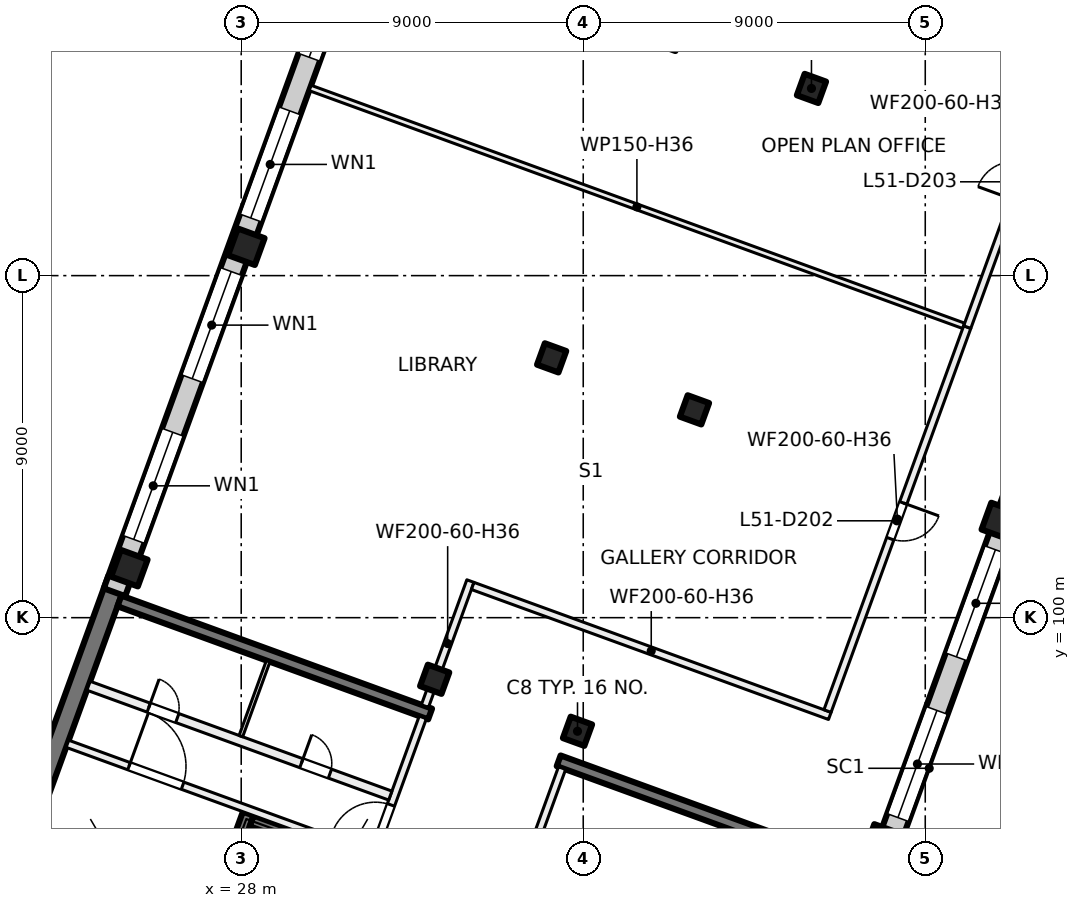
"""IFC4 building model, lengths in metres.
Left out: names, types, materials, properties, quantities, classifications, styles, units other than length and angle.
Written with IfcOpenShell. Run it as: python <this file> out.ifc"""

import sys

from ifc_helpers import new_model, si_unit, direction, frame, frame_2d, origin, origin_2d, place, context, subcontext, project, spatial, rectangle, extrude, element, fill, save


model = new_model("IFC4")
c1 = context("Model", 3, precision=1e-05, world=origin(), true_north=direction((0.0, 1.0)))
c2 = subcontext(c1, "Body", "Model", "MODEL_VIEW")
j1 = project(units=[si_unit("LENGTHUNIT", "METRE"), si_unit("PLANEANGLEUNIT", "RADIAN")], contexts=[c1])
p1 = place(None, origin())
s1 = spatial("IfcSite", under=j1, at=p1, CompositionType="ELEMENT")
p2 = place(p1, origin())
s2 = spatial("IfcBuilding", under=s1, at=p2, CompositionType="ELEMENT")
p3 = place(p2, frame((0.0, 0.0, 216.0)))
s3 = spatial("IfcBuildingStorey", under=s2, at=p3, CompositionType="ELEMENT", Elevation=216.0)
for number, where, z_axis, x_axis in (
    (1, (43.006, 113.925, 0.0), (0.0, 0.0, 1.0), (-0.342, -0.94, 0.0)),
    (2, (39.927, 105.468, 0.0), (0.0, 0.0, 1.0), (-0.342, -0.94, 0.0)),
    (3, (36.849, 97.011, 0.0), (0.0, 0.0, 1.0), (-0.342, -0.94, 0.0)),
    (4, (36.169, 106.836, 0.0), (0.0, 0.0, 1.0), (-0.342, -0.94, 0.0)),
    (5, (33.091, 98.379, 0.0), (0.0, 0.0, 1.0), (-0.342, -0.94, 0.0)),
):
    element("IfcColumn", number, at=place(p3, frame(where, z_axis=z_axis, x_axis=x_axis)), inside=s3, PredefinedType="COLUMN", context=c2, shape_type="SweptSolid", body=[
        extrude(rectangle(XDim=0.6, YDim=0.6, at=origin_2d()), origin(), (0.0, 0.0, 1.0), 4.0),
    ])
for number, where, z_axis, x_axis in (
    (6, (47.962, 102.544, 0.0), (0.0, 0.0, 1.0), (-0.342, -0.94, 0.0)),
    (7, (44.884, 94.087, 0.0), (0.0, 0.0, 1.0), (-0.342, -0.94, 0.0)),
    (8, (28.134, 109.76, 0.0), (0.0, 0.0, 1.0), (-0.342, -0.94, 0.0)),
    (9, (25.056, 101.303, 0.0), (0.0, 0.0, 1.0), (-0.342, -0.94, 0.0)),
):
    element("IfcColumn", number, at=place(p3, frame(where, z_axis=z_axis, x_axis=x_axis)), inside=s3, PredefinedType="COLUMN", context=c2, shape_type="SweptSolid", body=[
        extrude(rectangle(XDim=0.75, YDim=0.75, at=origin_2d()), origin(), (0.0, 0.0, 1.0), 4.0),
    ])
p4 = place(p3, frame((21.67, 92.585, 0.0), z_axis=(0.0, 0.0, 1.0), x_axis=(0.342035714298, 0.93968695327, 0.0)))
e10 = element("IfcWall", 10, at=p4, inside=s3, PredefinedType="SHEAR", context=c2, shape_type="SweptSolid", body=[
    extrude(rectangle(XDim=8.975, YDim=0.5, at=frame_2d((4.488, 0.0))), origin(), (0.0, 0.0, 1.0), 4.0),
])
p5 = place(p3, frame((23.996, 83.332, 0.0), z_axis=(0.0, 0.0, 1.0), x_axis=(0.342016684409, 0.939693879721, 0.0)))
e11 = element("IfcWall", 11, at=p5, inside=s3, PredefinedType="SHEAR", context=c2, shape_type="SweptSolid", body=[
    extrude(rectangle(XDim=12.25, YDim=0.3, at=frame_2d((6.125, 0.0))), origin(), (0.0, 0.0, 1.0), 4.0),
])
p6 = place(p5, frame((8.0, 0.0, 0.0)))
e12 = element("IfcOpeningElement", 12, at=p6, cuts=e11, PredefinedType="OPENING", context=c2, shape_type="SweptSolid", body=[
    extrude(rectangle(XDim=1.1, YDim=2.1, at=frame_2d((0.55, 1.05))), frame((0.0, 0.16, 0.0), z_axis=(0.0, -1.0, 0.0), x_axis=(1.0, 0.0, 0.0)), (0.0, 0.0, 1.0), 0.32),
])
p7 = place(p3, frame((31.188, 93.591, 0.0), z_axis=(0.0, 0.0, 1.0), x_axis=(-0.939680694448, 0.342052908892, 0.0)))
e13 = element("IfcWall", 13, at=p7, inside=s3, PredefinedType="SHEAR", context=c2, shape_type="SweptSolid", body=[
    extrude(rectangle(XDim=3.1, YDim=0.3, at=frame_2d((1.55, 0.0))), origin(), (0.0, 0.0, 1.0), 4.0),
])
p8 = place(p3, frame((44.529, 93.258, 0.0), z_axis=(0.0, 0.0, 1.0), x_axis=(-0.9396917844, 0.342022441267, 0.0)))
e14 = element("IfcWall", 14, at=p8, inside=s3, PredefinedType="SHEAR", context=c2, shape_type="SweptSolid", body=[
    extrude(rectangle(XDim=8.7, YDim=0.3, at=frame_2d((4.35, 0.0))), origin(), (0.0, 0.0, 1.0), 4.0),
])
p9 = place(p3, frame((32.971, 97.465, 0.0), z_axis=(0.0, 0.0, 1.0), x_axis=(-0.939695066972, 0.34201342241, 0.0)))
e15 = element("IfcWall", 15, at=p9, inside=s3, PredefinedType="SHEAR", context=c2, shape_type="SweptSolid", body=[
    extrude(rectangle(XDim=8.7, YDim=0.3, at=frame_2d((4.35, 0.0))), origin(), (0.0, 0.0, 1.0), 4.0),
])
p10 = place(p3, frame((51.877, 112.862, 0.0), z_axis=(0.0, 0.0, 1.0), x_axis=(-0.342020589714, -0.939692458314, 0.0)))
e16 = element("IfcWall", 16, at=p10, inside=s3, PredefinedType="SOLIDWALL", context=c2, shape_type="SweptSolid", body=[
    extrude(rectangle(XDim=20.765, YDim=0.6, at=frame_2d((10.382, 0.0))), origin(), (0.0, 0.0, 1.0), 3.625),
])
p11 = place(p10, frame((2.785, 0.0, 0.9)))
e17 = element("IfcOpeningElement", 17, at=p11, cuts=e16, PredefinedType="OPENING", context=c2, shape_type="SweptSolid", body=[
    extrude(rectangle(XDim=3.0, YDim=2.4, at=frame_2d((1.5, 1.2))), frame((0.0, 0.31, 0.0), z_axis=(0.0, -1.0, 0.0), x_axis=(1.0, 0.0, 0.0)), (0.0, 0.0, 1.0), 0.62),
])
p12 = place(p10, frame((7.285, 0.0, 0.9)))
e18 = element("IfcOpeningElement", 18, at=p12, cuts=e16, PredefinedType="OPENING", context=c2, shape_type="SweptSolid", body=[
    extrude(rectangle(XDim=3.0, YDim=2.4, at=frame_2d((1.5, 1.2))), frame((0.0, 0.31, 0.0), z_axis=(0.0, -1.0, 0.0), x_axis=(1.0, 0.0, 0.0)), (0.0, 0.0, 1.0), 0.62),
])
p13 = place(p10, frame((11.785, 0.0, 0.9)))
e19 = element("IfcOpeningElement", 19, at=p13, cuts=e16, PredefinedType="OPENING", context=c2, shape_type="SweptSolid", body=[
    extrude(rectangle(XDim=3.0, YDim=2.4, at=frame_2d((1.5, 1.2))), frame((0.0, 0.31, 0.0), z_axis=(0.0, -1.0, 0.0), x_axis=(1.0, 0.0, 0.0)), (0.0, 0.0, 1.0), 0.62),
])
p14 = place(p10, frame((16.285, 0.0, 0.9)))
e20 = element("IfcOpeningElement", 20, at=p14, cuts=e16, PredefinedType="OPENING", context=c2, shape_type="SweptSolid", body=[
    extrude(rectangle(XDim=3.0, YDim=2.4, at=frame_2d((1.5, 1.2))), frame((0.0, 0.31, 0.0), z_axis=(0.0, -1.0, 0.0), x_axis=(1.0, 0.0, 0.0)), (0.0, 0.0, 1.0), 0.62),
])
p15 = place(p3, frame((36.923, 134.338, 0.0), z_axis=(0.0, 0.0, 1.0), x_axis=(0.573575266068, -0.819152863729, 0.0)))
e21 = element("IfcWall", 21, at=p15, inside=s3, PredefinedType="SOLIDWALL", context=c2, shape_type="SweptSolid", body=[
    extrude(rectangle(XDim=26.117, YDim=0.6, at=frame_2d((13.059, 0.0))), origin(), (0.0, 0.0, 1.0), 3.625),
])
p16 = place(p15, frame((0.84, 0.0, 0.9)))
e22 = element("IfcOpeningElement", 22, at=p16, cuts=e21, PredefinedType="OPENING", context=c2, shape_type="SweptSolid", body=[
    extrude(rectangle(XDim=3.0, YDim=2.4, at=frame_2d((1.5, 1.2))), frame((0.0, 0.31, 0.0), z_axis=(0.0, -1.0, 0.0), x_axis=(1.0, 0.0, 0.0)), (0.0, 0.0, 1.0), 0.62),
])
p17 = place(p15, frame((5.069, 0.0, 0.9)))
e23 = element("IfcOpeningElement", 23, at=p17, cuts=e21, PredefinedType="OPENING", context=c2, shape_type="SweptSolid", body=[
    extrude(rectangle(XDim=3.0, YDim=2.4, at=frame_2d((1.5, 1.2))), frame((0.0, 0.31, 0.0), z_axis=(0.0, -1.0, 0.0), x_axis=(1.0, 0.0, 0.0)), (0.0, 0.0, 1.0), 0.62),
])
p18 = place(p15, frame((9.449, 0.0, 0.9)))
e24 = element("IfcOpeningElement", 24, at=p18, cuts=e21, PredefinedType="OPENING", context=c2, shape_type="SweptSolid", body=[
    extrude(rectangle(XDim=3.0, YDim=2.4, at=frame_2d((1.5, 1.2))), frame((0.0, 0.31, 0.0), z_axis=(0.0, -1.0, 0.0), x_axis=(1.0, 0.0, 0.0)), (0.0, 0.0, 1.0), 0.62),
])
p19 = place(p15, frame((13.829, 0.0, 0.9)))
e25 = element("IfcOpeningElement", 25, at=p19, cuts=e21, PredefinedType="OPENING", context=c2, shape_type="SweptSolid", body=[
    extrude(rectangle(XDim=3.0, YDim=2.4, at=frame_2d((1.5, 1.2))), frame((0.0, 0.31, 0.0), z_axis=(0.0, -1.0, 0.0), x_axis=(1.0, 0.0, 0.0)), (0.0, 0.0, 1.0), 0.62),
])
p20 = place(p15, frame((18.208, 0.0, 0.9)))
e26 = element("IfcOpeningElement", 26, at=p20, cuts=e21, PredefinedType="OPENING", context=c2, shape_type="SweptSolid", body=[
    extrude(rectangle(XDim=3.0, YDim=2.4, at=frame_2d((1.5, 1.2))), frame((0.0, 0.31, 0.0), z_axis=(0.0, -1.0, 0.0), x_axis=(1.0, 0.0, 0.0)), (0.0, 0.0, 1.0), 0.62),
])
p21 = place(p15, frame((22.438, 0.0, 0.9)))
e27 = element("IfcOpeningElement", 27, at=p21, cuts=e21, PredefinedType="OPENING", context=c2, shape_type="SweptSolid", body=[
    extrude(rectangle(XDim=3.0, YDim=2.4, at=frame_2d((1.5, 1.2))), frame((0.0, 0.31, 0.0), z_axis=(0.0, -1.0, 0.0), x_axis=(1.0, 0.0, 0.0)), (0.0, 0.0, 1.0), 0.62),
])
p22 = place(p3, frame((24.666, 100.669, 0.0), z_axis=(0.0, 0.0, 1.0), x_axis=(0.34201964167, 0.939692803373, 0.0)))
e28 = element("IfcWall", 28, at=p22, inside=s3, PredefinedType="SOLIDWALL", context=c2, shape_type="SweptSolid", body=[
    extrude(rectangle(XDim=32.884, YDim=0.6, at=frame_2d((16.442, 0.0))), origin(), (0.0, 0.0, 1.0), 3.625),
])
p23 = place(p22, frame((1.48, 0.0, 0.9)))
e29 = element("IfcOpeningElement", 29, at=p23, cuts=e28, PredefinedType="OPENING", context=c2, shape_type="SweptSolid", body=[
    extrude(rectangle(XDim=3.0, YDim=2.4, at=frame_2d((1.5, 1.2))), frame((0.0, 0.31, 0.0), z_axis=(0.0, -1.0, 0.0), x_axis=(1.0, 0.0, 0.0)), (0.0, 0.0, 1.0), 0.62),
])
p24 = place(p22, frame((5.98, 0.0, 0.9)))
e30 = element("IfcOpeningElement", 30, at=p24, cuts=e28, PredefinedType="OPENING", context=c2, shape_type="SweptSolid", body=[
    extrude(rectangle(XDim=3.0, YDim=2.4, at=frame_2d((1.5, 1.2))), frame((0.0, 0.31, 0.0), z_axis=(0.0, -1.0, 0.0), x_axis=(1.0, 0.0, 0.0)), (0.0, 0.0, 1.0), 0.62),
])
p25 = place(p22, frame((10.48, 0.0, 0.9)))
e31 = element("IfcOpeningElement", 31, at=p25, cuts=e28, PredefinedType="OPENING", context=c2, shape_type="SweptSolid", body=[
    extrude(rectangle(XDim=3.0, YDim=2.4, at=frame_2d((1.5, 1.2))), frame((0.0, 0.31, 0.0), z_axis=(0.0, -1.0, 0.0), x_axis=(1.0, 0.0, 0.0)), (0.0, 0.0, 1.0), 0.62),
])
p26 = place(p22, frame((14.98, 0.0, 0.9)))
e32 = element("IfcOpeningElement", 32, at=p26, cuts=e28, PredefinedType="OPENING", context=c2, shape_type="SweptSolid", body=[
    extrude(rectangle(XDim=3.0, YDim=2.4, at=frame_2d((1.5, 1.2))), frame((0.0, 0.31, 0.0), z_axis=(0.0, -1.0, 0.0), x_axis=(1.0, 0.0, 0.0)), (0.0, 0.0, 1.0), 0.62),
])
p27 = place(p22, frame((19.48, 0.0, 0.9)))
e33 = element("IfcOpeningElement", 33, at=p27, cuts=e28, PredefinedType="OPENING", context=c2, shape_type="SweptSolid", body=[
    extrude(rectangle(XDim=3.0, YDim=2.4, at=frame_2d((1.5, 1.2))), frame((0.0, 0.31, 0.0), z_axis=(0.0, -1.0, 0.0), x_axis=(1.0, 0.0, 0.0)), (0.0, 0.0, 1.0), 0.62),
])
p28 = place(p22, frame((23.98, 0.0, 0.9)))
e34 = element("IfcOpeningElement", 34, at=p28, cuts=e28, PredefinedType="OPENING", context=c2, shape_type="SweptSolid", body=[
    extrude(rectangle(XDim=3.0, YDim=2.4, at=frame_2d((1.5, 1.2))), frame((0.0, 0.31, 0.0), z_axis=(0.0, -1.0, 0.0), x_axis=(1.0, 0.0, 0.0)), (0.0, 0.0, 1.0), 0.62),
])
p29 = place(p22, frame((28.48, 0.0, 0.9)))
e35 = element("IfcOpeningElement", 35, at=p29, cuts=e28, PredefinedType="OPENING", context=c2, shape_type="SweptSolid", body=[
    extrude(rectangle(XDim=3.0, YDim=2.4, at=frame_2d((1.5, 1.2))), frame((0.0, 0.31, 0.0), z_axis=(0.0, -1.0, 0.0), x_axis=(1.0, 0.0, 0.0)), (0.0, 0.0, 1.0), 0.62),
])
p30 = place(p3, frame((31.427, 93.663, 0.0), z_axis=(0.0, 0.0, 1.0), x_axis=(0.342030870568, 0.93968871632, 0.0)))
e36 = element("IfcWall", 36, at=p30, inside=s3, PredefinedType="PARTITIONING", context=c2, shape_type="SweptSolid", body=[
    extrude(rectangle(XDim=3.95, YDim=0.2, at=frame_2d((1.975, 0.0))), origin(), (0.0, 0.0, 1.0), 3.625),
])
p31 = place(p30, frame((0.3, 0.0, 0.0)))
e37 = element("IfcOpeningElement", 37, at=p31, cuts=e36, PredefinedType="OPENING", context=c2, shape_type="SweptSolid", body=[
    extrude(rectangle(XDim=1.2, YDim=2.1, at=frame_2d((0.6, 1.05))), frame((0.0, 0.11, 0.0), z_axis=(0.0, -1.0, 0.0), x_axis=(1.0, 0.0, 0.0)), (0.0, 0.0, 1.0), 0.22),
])
p32 = place(p3, frame((23.427, 96.682, 0.0), z_axis=(0.0, 0.0, 1.0), x_axis=(0.939690465531, -0.342026064782, 0.0)))
e38 = element("IfcWall", 38, at=p32, inside=s3, PredefinedType="PARTITIONING", context=c2, shape_type="SweptSolid", body=[
    extrude(rectangle(XDim=8.45, YDim=0.2, at=frame_2d((4.225, 0.0))), origin(), (0.0, 0.0, 1.0), 3.625),
])
p33 = place(p32, frame((1.725, 0.0, 0.0)))
e39 = element("IfcOpeningElement", 39, at=p33, cuts=e38, PredefinedType="OPENING", context=c2, shape_type="SweptSolid", body=[
    extrude(rectangle(XDim=1.5, YDim=2.1, at=frame_2d((0.75, 1.05))), frame((0.0, 0.11, 0.0), z_axis=(0.0, -1.0, 0.0), x_axis=(1.0, 0.0, 0.0)), (0.0, 0.0, 1.0), 0.22),
])
p34 = place(p3, frame((23.983, 98.208, 0.0), z_axis=(0.0, 0.0, 1.0), x_axis=(0.939699751196, -0.342000552051, 0.0)))
e40 = element("IfcWall", 40, at=p34, inside=s3, PredefinedType="PARTITIONING", context=c2, shape_type="SweptSolid", body=[
    extrude(rectangle(XDim=8.45, YDim=0.25, at=frame_2d((4.225, 0.0))), origin(), (0.0, 0.0, 1.0), 3.625),
])
p35 = place(p34, frame((5.96, 0.0, 0.0)))
e41 = element("IfcOpeningElement", 41, at=p35, cuts=e40, PredefinedType="OPENING", context=c2, shape_type="SweptSolid", body=[
    extrude(rectangle(XDim=0.8, YDim=2.1, at=frame_2d((0.4, 1.05))), frame((0.0, 0.135, 0.0), z_axis=(0.0, -1.0, 0.0), x_axis=(1.0, 0.0, 0.0)), (0.0, 0.0, 1.0), 0.27),
])
p36 = place(p34, frame((1.685, 0.0, 0.0)))
e42 = element("IfcOpeningElement", 42, at=p36, cuts=e40, PredefinedType="OPENING", context=c2, shape_type="SweptSolid", body=[
    extrude(rectangle(XDim=0.8, YDim=2.1, at=frame_2d((0.4, 1.05))), frame((0.0, 0.135, 0.0), z_axis=(0.0, -1.0, 0.0), x_axis=(1.0, 0.0, 0.0)), (0.0, 0.0, 1.0), 0.27),
])
p37 = place(p3, frame((27.991, 96.883, 0.0), z_axis=(0.0, 0.0, 1.0), x_axis=(0.342023078919, 0.939691552312, 0.0)))
e43 = element("IfcWall", 43, at=p37, inside=s3, PredefinedType="PARTITIONING", context=c2, shape_type="SweptSolid", body=[
    extrude(rectangle(XDim=2.1, YDim=0.1, at=frame_2d((1.05, 0.0))), origin(), (0.0, 0.0, 1.0), 3.625),
])
p38 = place(p3, frame((36.443, 96.041, 0.0), z_axis=(0.0, 0.0, 1.0), x_axis=(-0.341996156931, -0.939701350773, 0.0)))
e44 = element("IfcWall", 44, at=p38, inside=s3, PredefinedType="PARTITIONING", context=c2, shape_type="SweptSolid", body=[
    extrude(rectangle(XDim=3.95, YDim=0.2, at=frame_2d((1.975, 0.0))), origin(), (0.0, 0.0, 1.0), 3.625),
])
p39 = place(p38, frame((2.45, 0.0, 0.0)))
e45 = element("IfcOpeningElement", 45, at=p39, cuts=e44, PredefinedType="OPENING", context=c2, shape_type="SweptSolid", body=[
    extrude(rectangle(XDim=1.2, YDim=2.1, at=frame_2d((0.6, 1.05))), frame((0.0, 0.11, 0.0), z_axis=(0.0, -1.0, 0.0), x_axis=(1.0, 0.0, 0.0)), (0.0, 0.0, 1.0), 0.22),
])
p40 = place(p3, frame((29.814, 113.938, 0.0), z_axis=(0.0, 0.0, 1.0), x_axis=(0.939695619185, -0.342011905181, 0.0)))
e46 = element("IfcWall", 46, at=p40, inside=s3, PredefinedType="PARTITIONING", context=c2, shape_type="SweptSolid", body=[
    extrude(rectangle(XDim=18.301, YDim=0.15, at=frame_2d((9.15, 0.0))), origin(), (0.0, 0.0, 1.0), 3.625),
])
p41 = place(p3, frame((32.834, 97.674, 0.0), z_axis=(0.0, 0.0, 1.0), x_axis=(0.342017493073, 0.939693585395, 0.0)))
e47 = element("IfcWall", 47, at=p41, inside=s3, PredefinedType="PARTITIONING", context=c2, shape_type="SweptSolid", body=[
    extrude(rectangle(XDim=3.5, YDim=0.2, at=frame_2d((1.75, 0.0))), origin(), (0.0, 0.0, 1.0), 3.625),
])
p42 = place(p3, frame((34.091, 100.835, 0.0), z_axis=(0.0, 0.0, 1.0), x_axis=(0.939702148643, -0.341993964619, 0.0)))
e48 = element("IfcWall", 48, at=p42, inside=s3, PredefinedType="PARTITIONING", context=c2, shape_type="SweptSolid", body=[
    extrude(rectangle(XDim=10.0, YDim=0.2, at=frame_2d((5.0, 0.0))), origin(), (0.0, 0.0, 1.0), 3.625),
])
p43 = place(p3, frame((43.428, 97.543, 0.0), z_axis=(0.0, 0.0, 1.0), x_axis=(0.342032970316, 0.939687952044, 0.0)))
e49 = element("IfcWall", 49, at=p43, inside=s3, PredefinedType="PARTITIONING", context=c2, shape_type="SweptSolid", body=[
    extrude(rectangle(XDim=10.75, YDim=0.2, at=frame_2d((5.375, 0.0))), origin(), (0.0, 0.0, 1.0), 3.625),
])
p44 = place(p43, frame((4.827, 0.0, 0.0)))
e50 = element("IfcOpeningElement", 50, at=p44, cuts=e49, PredefinedType="OPENING", context=c2, shape_type="SweptSolid", body=[
    extrude(rectangle(XDim=1.0, YDim=2.1, at=frame_2d((0.5, 1.05))), frame((0.0, 0.11, 0.0), z_axis=(0.0, -1.0, 0.0), x_axis=(1.0, 0.0, 0.0)), (0.0, 0.0, 1.0), 0.22),
])
p45 = place(p3, frame((47.105, 107.645, 0.0), z_axis=(0.0, 0.0, 1.0), x_axis=(0.342043994394, 0.939683939364, 0.0)))
e51 = element("IfcWall", 51, at=p45, inside=s3, PredefinedType="PARTITIONING", context=c2, shape_type="SweptSolid", body=[
    extrude(rectangle(XDim=8.142, YDim=0.2, at=frame_2d((4.071, 0.0))), origin(), (0.0, 0.0, 1.0), 3.625),
])
p46 = place(p45, frame((3.569, 0.0, 0.0)))
e52 = element("IfcOpeningElement", 52, at=p46, cuts=e51, PredefinedType="OPENING", context=c2, shape_type="SweptSolid", body=[
    extrude(rectangle(XDim=1.0, YDim=2.1, at=frame_2d((0.5, 1.05))), frame((0.0, 0.11, 0.0), z_axis=(0.0, -1.0, 0.0), x_axis=(1.0, 0.0, 0.0)), (0.0, 0.0, 1.0), 0.22),
])
p47 = place(p13, origin())
e53 = element("IfcWindow", 53, at=p47, inside=s3, PartitioningType="SINGLE_PANEL", PredefinedType="WINDOW", context=c2, shape_type="SweptSolid", body=[
    extrude(rectangle(XDim=3.0, YDim=2.4, at=frame_2d((1.5, 1.2))), frame((0.0, 0.03, 0.0), z_axis=(0.0, -1.0, 0.0), x_axis=(1.0, 0.0, 0.0)), (0.0, 0.0, 1.0), 0.06),
])
fill(e19, e53)
p48 = place(p14, origin())
e54 = element("IfcWindow", 54, at=p48, inside=s3, PartitioningType="SINGLE_PANEL", PredefinedType="WINDOW", context=c2, shape_type="SweptSolid", body=[
    extrude(rectangle(XDim=3.0, YDim=2.4, at=frame_2d((1.5, 1.2))), frame((0.0, 0.03, 0.0), z_axis=(0.0, -1.0, 0.0), x_axis=(1.0, 0.0, 0.0)), (0.0, 0.0, 1.0), 0.06),
])
fill(e20, e54)
p49 = place(p23, origin())
e55 = element("IfcWindow", 55, at=p49, inside=s3, PartitioningType="SINGLE_PANEL", PredefinedType="WINDOW", context=c2, shape_type="SweptSolid", body=[
    extrude(rectangle(XDim=3.0, YDim=2.4, at=frame_2d((1.5, 1.2))), frame((0.0, 0.03, 0.0), z_axis=(0.0, -1.0, 0.0), x_axis=(1.0, 0.0, 0.0)), (0.0, 0.0, 1.0), 0.06),
])
fill(e29, e55)
p50 = place(p24, origin())
e56 = element("IfcWindow", 56, at=p50, inside=s3, PartitioningType="SINGLE_PANEL", PredefinedType="WINDOW", context=c2, shape_type="SweptSolid", body=[
    extrude(rectangle(XDim=3.0, YDim=2.4, at=frame_2d((1.5, 1.2))), frame((0.0, 0.03, 0.0), z_axis=(0.0, -1.0, 0.0), x_axis=(1.0, 0.0, 0.0)), (0.0, 0.0, 1.0), 0.06),
])
fill(e30, e56)
p51 = place(p25, origin())
e57 = element("IfcWindow", 57, at=p51, inside=s3, PartitioningType="SINGLE_PANEL", PredefinedType="WINDOW", context=c2, shape_type="SweptSolid", body=[
    extrude(rectangle(XDim=3.0, YDim=2.4, at=frame_2d((1.5, 1.2))), frame((0.0, 0.03, 0.0), z_axis=(0.0, -1.0, 0.0), x_axis=(1.0, 0.0, 0.0)), (0.0, 0.0, 1.0), 0.06),
])
fill(e31, e57)
p52 = place(p26, origin())
e58 = element("IfcWindow", 58, at=p52, inside=s3, PartitioningType="SINGLE_PANEL", PredefinedType="WINDOW", context=c2, shape_type="SweptSolid", body=[
    extrude(rectangle(XDim=3.0, YDim=2.4, at=frame_2d((1.5, 1.2))), frame((0.0, 0.03, 0.0), z_axis=(0.0, -1.0, 0.0), x_axis=(1.0, 0.0, 0.0)), (0.0, 0.0, 1.0), 0.06),
])
fill(e32, e58)
p53 = place(p31, origin())
e59 = element("IfcDoor", 59, at=p53, inside=s3, OperationType="DOUBLE_DOOR_SINGLE_SWING", PredefinedType="DOOR", context=c2, shape_type="SweptSolid", body=[
    extrude(rectangle(XDim=1.2, YDim=2.1, at=frame_2d((0.6, 1.05))), frame((0.0, 0.025, 0.0), z_axis=(0.0, -1.0, 0.0), x_axis=(1.0, 0.0, 0.0)), (0.0, 0.0, 1.0), 0.05),
])
fill(e37, e59)
p54 = place(p33, origin())
e60 = element("IfcDoor", 60, at=p54, inside=s3, OperationType="DOUBLE_DOOR_SINGLE_SWING", PredefinedType="DOOR", context=c2, shape_type="SweptSolid", body=[
    extrude(rectangle(XDim=1.5, YDim=2.1, at=frame_2d((0.75, 1.05))), frame((0.0, 0.025, 0.0), z_axis=(0.0, -1.0, 0.0), x_axis=(1.0, 0.0, 0.0)), (0.0, 0.0, 1.0), 0.05),
])
fill(e39, e60)
p55 = place(p35, origin())
e61 = element("IfcDoor", 61, at=p55, inside=s3, OperationType="SINGLE_SWING_LEFT", PredefinedType="DOOR", context=c2, shape_type="SweptSolid", body=[
    extrude(rectangle(XDim=0.8, YDim=2.1, at=frame_2d((0.4, 1.05))), frame((0.0, 0.025, 0.0), z_axis=(0.0, -1.0, 0.0), x_axis=(1.0, 0.0, 0.0)), (0.0, 0.0, 1.0), 0.05),
])
fill(e41, e61)
p56 = place(p36, origin())
e62 = element("IfcDoor", 62, at=p56, inside=s3, OperationType="SINGLE_SWING_RIGHT", PredefinedType="DOOR", context=c2, shape_type="SweptSolid", body=[
    extrude(rectangle(XDim=0.8, YDim=2.1, at=frame_2d((0.4, 1.05))), frame((0.0, 0.025, 0.0), z_axis=(0.0, -1.0, 0.0), x_axis=(1.0, 0.0, 0.0)), (0.0, 0.0, 1.0), 0.05),
])
fill(e42, e62)
p57 = place(p44, origin())
e63 = element("IfcDoor", 63, at=p57, inside=s3, OperationType="SINGLE_SWING_RIGHT", PredefinedType="DOOR", context=c2, shape_type="SweptSolid", body=[
    extrude(rectangle(XDim=1.0, YDim=2.1, at=frame_2d((0.5, 1.05))), frame((0.0, 0.025, 0.0), z_axis=(0.0, -1.0, 0.0), x_axis=(1.0, 0.0, 0.0)), (0.0, 0.0, 1.0), 0.05),
])
fill(e50, e63)
save(model, sys.argv[1])
